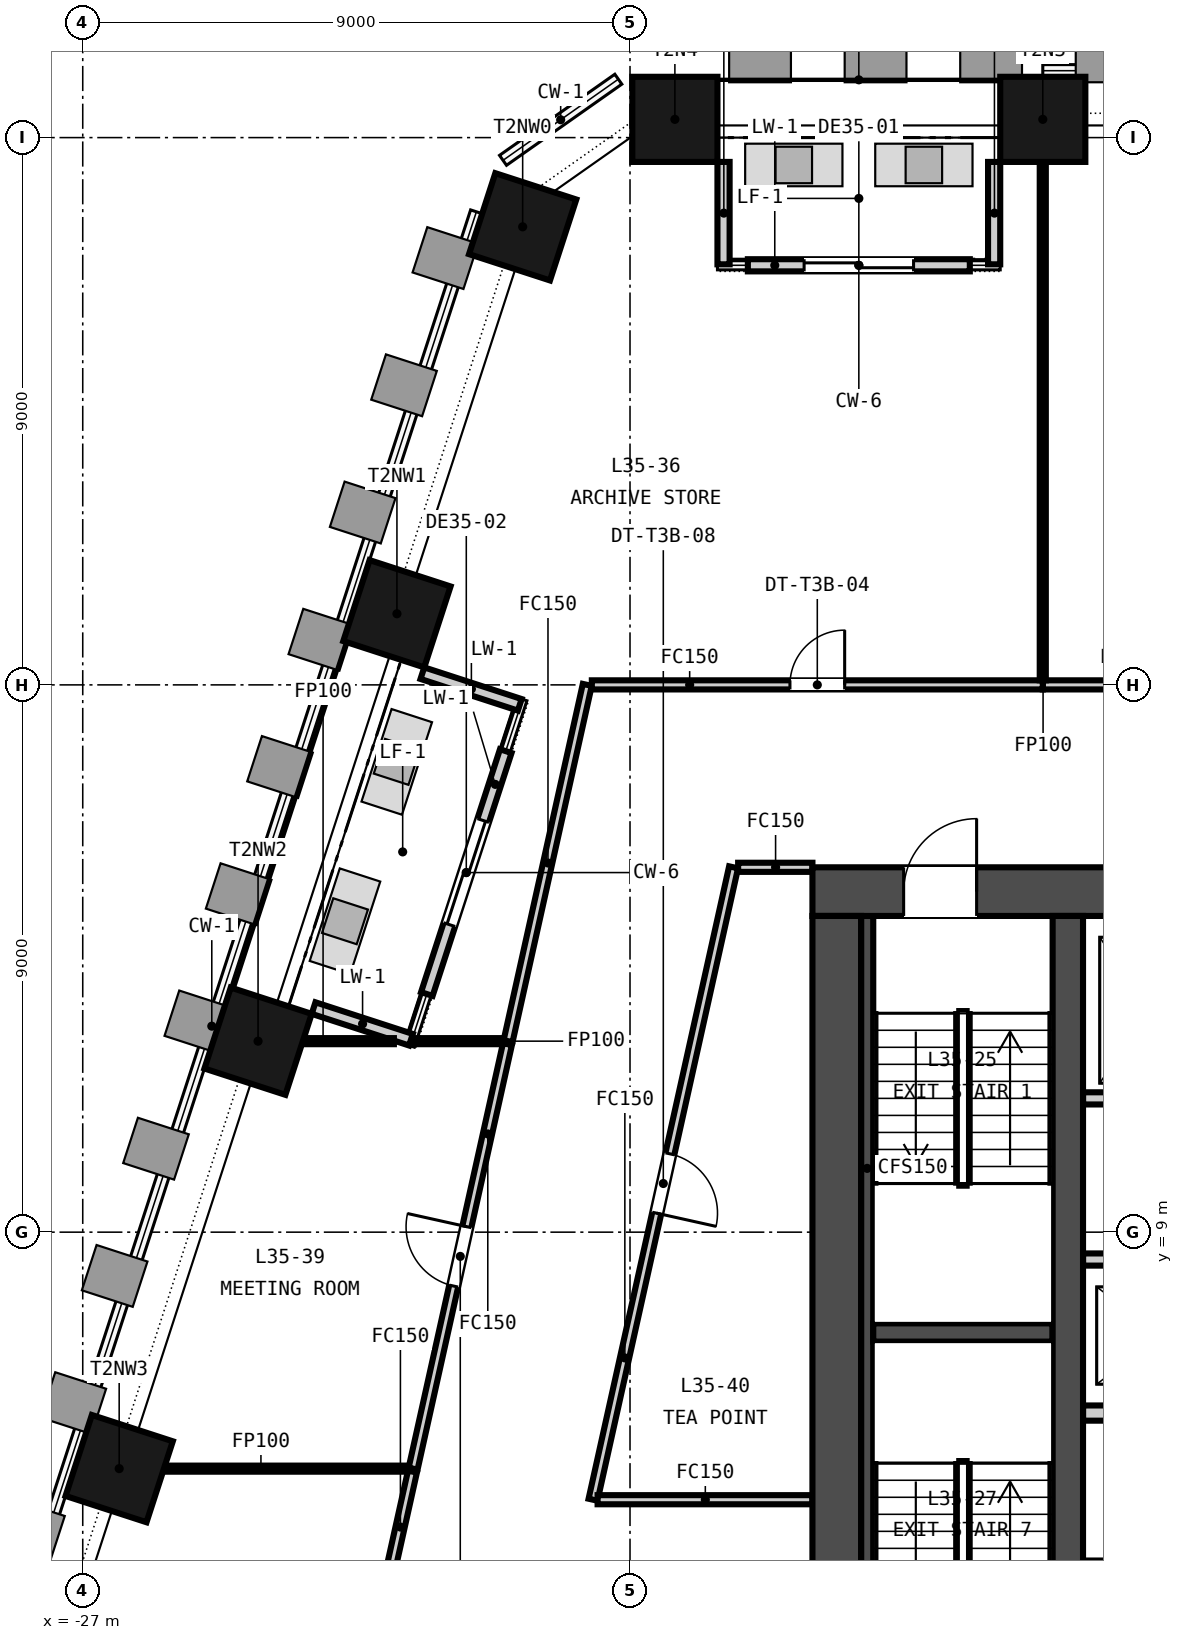
"""IFC4 building model, lengths in metres.
Left out: names, types, materials, properties, quantities, classifications, styles, units other than length and angle.
Written with IfcOpenShell. Run it as: python <this file> out.ifc"""

import sys

from ifc_helpers import new_model, si_unit, direction, frame, frame_2d, origin, origin_2d, place, context, subcontext, project, spatial, rectangle, extrude, element, fill, save


model = new_model("IFC4")
c1 = context("Model", 3, precision=1e-05, world=origin(), true_north=direction((0.0, 1.0)))
c2 = subcontext(c1, "Body", "Model", "MODEL_VIEW")
j1 = project(units=[si_unit("LENGTHUNIT", "METRE"), si_unit("PLANEANGLEUNIT", "RADIAN")], contexts=[c1])
p1 = place(None, origin())
s1 = spatial("IfcSite", under=j1, at=p1, CompositionType="ELEMENT")
p2 = place(p1, origin())
s2 = spatial("IfcBuilding", under=s1, at=p2, CompositionType="ELEMENT")
p3 = place(p2, frame((0.0, 0.0, 144.4)))
s3 = spatial("IfcBuildingStorey", under=s2, at=p3, CompositionType="ELEMENT", Elevation=144.4)
p4 = place(p3, frame((-15.0, 14.6, -0.15), z_axis=(0.0, 0.0, 1.0), x_axis=(1.0, 0.0, 0.0)))
e1 = element("IfcWall", 1, at=p4, inside=s3, PredefinedType="SOLIDWALL", context=c2, shape_type="SweptSolid", body=[
    extrude(rectangle(XDim=30.0, YDim=0.8, at=frame_2d((15.0, 0.0))), origin(), (0.0, 0.0, 1.0), 3.65),
])
p5 = place(p4, frame((9.25, 0.0, 0.15)))
e2 = element("IfcOpeningElement", 2, at=p5, cuts=e1, PredefinedType="OPENING", context=c2, shape_type="SweptSolid", body=[
    extrude(rectangle(XDim=1.5, YDim=2.1, at=frame_2d((0.75, 1.05))), frame((0.0, 0.41, 0.0), z_axis=(0.0, -1.0, 0.0), x_axis=(1.0, 0.0, 0.0)), (0.0, 0.0, 1.0), 0.82),
])
p6 = place(p4, frame((19.4, 0.0, 0.15)))
e3 = element("IfcOpeningElement", 3, at=p6, cuts=e1, PredefinedType="OPENING", context=c2, shape_type="SweptSolid", body=[
    extrude(rectangle(XDim=1.5, YDim=2.1, at=frame_2d((0.75, 1.05))), frame((0.0, 0.41, 0.0), z_axis=(0.0, -1.0, 0.0), x_axis=(1.0, 0.0, 0.0)), (0.0, 0.0, 1.0), 0.82),
])
p7 = place(p4, frame((1.5, 0.0, 0.15)))
e4 = element("IfcOpeningElement", 4, at=p7, cuts=e1, PredefinedType="OPENING", context=c2, shape_type="SweptSolid", body=[
    extrude(rectangle(XDim=1.2, YDim=2.1, at=frame_2d((0.6, 1.05))), frame((0.0, 0.41, 0.0), z_axis=(0.0, -1.0, 0.0), x_axis=(1.0, 0.0, 0.0)), (0.0, 0.0, 1.0), 0.82),
])
p8 = place(p4, frame((27.3, 0.0, 0.15)))
e5 = element("IfcOpeningElement", 5, at=p8, cuts=e1, PredefinedType="OPENING", context=c2, shape_type="SweptSolid", body=[
    extrude(rectangle(XDim=1.2, YDim=2.1, at=frame_2d((0.6, 1.05))), frame((0.0, 0.41, 0.0), z_axis=(0.0, -1.0, 0.0), x_axis=(1.0, 0.0, 0.0)), (0.0, 0.0, 1.0), 0.82),
])
p9 = place(p3, frame((-14.6, 0.8, -0.15), z_axis=(0.0, 0.0, 1.0), x_axis=(0.0, 1.0, 0.0)))
e6 = element("IfcWall", 6, at=p9, inside=s3, PredefinedType="SOLIDWALL", context=c2, shape_type="SweptSolid", body=[
    extrude(rectangle(XDim=13.4, YDim=0.8, at=frame_2d((6.7, 0.0))), origin(), (0.0, 0.0, 1.0), 3.65),
])
p10 = place(p3, frame((-10.8, 0.8, -0.15), z_axis=(0.0, 0.0, 1.0), x_axis=(0.0, 1.0, 0.0)))
e7 = element("IfcWall", 7, at=p10, inside=s3, PredefinedType="SOLIDWALL", context=c2, shape_type="SweptSolid", body=[
    extrude(rectangle(XDim=13.4, YDim=0.5, at=frame_2d((6.7, 0.0))), origin(), (0.0, 0.0, 1.0), 3.65),
])
for number, where, z_axis, x_axis in (
    (8, (-11.212, 27.3, -0.15), (0.0, 0.0, 1.0), (-1.0, 0.0, 0.0)),
    (9, (-17.262, 27.3, -0.15), (0.0, 0.0, 1.0), (-1.0, 0.0, 0.0)),
    (10, (-19.765, 25.533, -0.15), (0.0, 0.0, 1.0), (-0.309, -0.951, 0.0)),
    (11, (-21.833, 19.17, -0.15), (0.0, 0.0, 1.0), (-0.309, -0.951, 0.0)),
    (12, (-24.117, 12.141, -0.15), (0.0, 0.0, 1.0), (-0.309, -0.951, 0.0)),
    (13, (-26.401, 5.111, -0.15), (0.0, 0.0, 1.0), (-0.309, -0.951, 0.0)),
):
    element("IfcColumn", number, at=place(p3, frame(where, z_axis=z_axis, x_axis=x_axis)), inside=s3, PredefinedType="COLUMN", context=c2, shape_type="SweptSolid", body=[
        extrude(rectangle(XDim=1.4, YDim=1.4, at=origin_2d()), origin(), (0.0, 0.0, 1.0), 3.65),
    ])
p11 = place(p3, frame((-12.412, 24.9, 0.0), z_axis=(0.0, 0.0, 1.0), x_axis=(-1.0, 0.0, 0.0)))
e14 = element("IfcWall", 14, at=p11, inside=s3, PredefinedType="SOLIDWALL", context=c2, shape_type="SweptSolid", body=[
    extrude(rectangle(XDim=3.65, YDim=0.2, at=frame_2d((1.825, 0.0))), origin(), (0.0, 0.0, 1.0), 2.751),
])
p12 = place(p11, frame((0.925, 0.0, 0.0)))
e15 = element("IfcOpeningElement", 15, at=p12, cuts=e14, PredefinedType="OPENING", context=c2, shape_type="SweptSolid", body=[
    extrude(rectangle(XDim=1.8, YDim=2.4, at=frame_2d((0.9, 1.2))), frame((0.0, 0.11, 0.0), z_axis=(0.0, -1.0, 0.0), x_axis=(1.0, 0.0, 0.0)), (0.0, 0.0, 1.0), 0.22),
])
for number, where, z_axis, x_axis in (
    (16, (-12.012, 26.6, 0.0), (0.0, 0.0, 1.0), (0.0, -1.0, 0.0)),
    (17, (-16.462, 26.6, 0.0), (0.0, 0.0, 1.0), (0.0, -1.0, 0.0)),
):
    element("IfcWall", number, at=place(p3, frame(where, z_axis=z_axis, x_axis=x_axis)), inside=s3, PredefinedType="SOLIDWALL", context=c2, shape_type="SweptSolid", body=[
        extrude(rectangle(XDim=1.684, YDim=0.2, at=frame_2d((0.842, 0.0))), origin(), (0.0, 0.0, 1.0), 3.05),
    ])
p13 = place(p3, frame((-20.043, 16.911, 0.0), z_axis=(0.0, 0.0, 1.0), x_axis=(-0.30901640812, -0.951056706781, 0.0)))
e18 = element("IfcWall", 18, at=p13, inside=s3, PredefinedType="SOLIDWALL", context=c2, shape_type="SweptSolid", body=[
    extrude(rectangle(XDim=4.2, YDim=0.2, at=frame_2d((2.1, 0.0))), origin(), (0.0, 0.0, 1.0), 2.894),
])
p14 = place(p13, frame((1.2, 0.0, 0.0)))
e19 = element("IfcOpeningElement", 19, at=p14, cuts=e18, PredefinedType="OPENING", context=c2, shape_type="SweptSolid", body=[
    extrude(rectangle(XDim=1.8, YDim=2.4, at=frame_2d((0.9, 1.2))), frame((0.0, 0.11, 0.0), z_axis=(0.0, -1.0, 0.0), x_axis=(1.0, 0.0, 0.0)), (0.0, 0.0, 1.0), 0.22),
])
p15 = place(p3, frame((-21.415, 18.192, 0.0), z_axis=(0.0, 0.0, 1.0), x_axis=(0.951076677115, -0.308954938862, 0.0)))
e20 = element("IfcWall", 20, at=p15, inside=s3, PredefinedType="SOLIDWALL", context=c2, shape_type="SweptSolid", body=[
    extrude(rectangle(XDim=1.684, YDim=0.2, at=frame_2d((0.842, 0.0))), origin(), (0.0, 0.0, 1.0), 2.897),
])
p16 = place(p3, frame((-23.204, 12.685, 0.0), z_axis=(0.0, 0.0, 1.0), x_axis=(0.951034068731, -0.309086072338, 0.0)))
e21 = element("IfcWall", 21, at=p16, inside=s3, PredefinedType="SOLIDWALL", context=c2, shape_type="SweptSolid", body=[
    extrude(rectangle(XDim=1.684, YDim=0.2, at=frame_2d((0.842, 0.0))), origin(), (0.0, 0.0, 1.0), 2.9),
])
p17 = place(p3, frame((-10.55, 6.025, 0.0), z_axis=(0.0, 0.0, 1.0), x_axis=(1.0, 0.0, 0.0)))
e22 = element("IfcWall", 22, at=p17, inside=s3, PredefinedType="PARTITIONING", context=c2, shape_type="SweptSolid", body=[
    extrude(rectangle(XDim=21.1, YDim=0.25, at=frame_2d((10.55, 0.0))), origin(), (0.0, 0.0, 1.0), 3.5),
])
p18 = place(p3, frame((-10.55, 8.55, 0.0), z_axis=(0.0, 0.0, 1.0), x_axis=(1.0, 0.0, 0.0)))
e23 = element("IfcWall", 23, at=p18, inside=s3, PredefinedType="PARTITIONING", context=c2, shape_type="SweptSolid", body=[
    extrude(rectangle(XDim=21.1, YDim=0.2, at=frame_2d((10.55, 0.0))), origin(), (0.0, 0.0, 1.0), 3.5),
])
p19 = place(p18, frame((0.675, 0.0, 0.0)))
e24 = element("IfcOpeningElement", 24, at=p19, cuts=e23, PredefinedType="OPENING", context=c2, shape_type="SweptSolid", body=[
    extrude(rectangle(XDim=1.2, YDim=2.1, at=frame_2d((0.6, 1.05))), frame((0.0, 0.11, 0.0), z_axis=(0.0, -1.0, 0.0), x_axis=(1.0, 0.0, 0.0)), (0.0, 0.0, 1.0), 0.22),
])
p20 = place(p18, frame((3.475, 0.0, 0.0)))
e25 = element("IfcOpeningElement", 25, at=p20, cuts=e23, PredefinedType="OPENING", context=c2, shape_type="SweptSolid", body=[
    extrude(rectangle(XDim=1.2, YDim=2.1, at=frame_2d((0.6, 1.05))), frame((0.0, 0.11, 0.0), z_axis=(0.0, -1.0, 0.0), x_axis=(1.0, 0.0, 0.0)), (0.0, 0.0, 1.0), 0.22),
])
p21 = place(p18, frame((6.275, 0.0, 0.0)))
e26 = element("IfcOpeningElement", 26, at=p21, cuts=e23, PredefinedType="OPENING", context=c2, shape_type="SweptSolid", body=[
    extrude(rectangle(XDim=1.2, YDim=2.1, at=frame_2d((0.6, 1.05))), frame((0.0, 0.11, 0.0), z_axis=(0.0, -1.0, 0.0), x_axis=(1.0, 0.0, 0.0)), (0.0, 0.0, 1.0), 0.22),
])
p22 = place(p18, frame((9.075, 0.0, 0.0)))
e27 = element("IfcOpeningElement", 27, at=p22, cuts=e23, PredefinedType="OPENING", context=c2, shape_type="SweptSolid", body=[
    extrude(rectangle(XDim=1.2, YDim=2.1, at=frame_2d((0.6, 1.05))), frame((0.0, 0.11, 0.0), z_axis=(0.0, -1.0, 0.0), x_axis=(1.0, 0.0, 0.0)), (0.0, 0.0, 1.0), 0.22),
])
p23 = place(p18, frame((11.875, 0.0, 0.0)))
e28 = element("IfcOpeningElement", 28, at=p23, cuts=e23, PredefinedType="OPENING", context=c2, shape_type="SweptSolid", body=[
    extrude(rectangle(XDim=1.2, YDim=2.1, at=frame_2d((0.6, 1.05))), frame((0.0, 0.11, 0.0), z_axis=(0.0, -1.0, 0.0), x_axis=(1.0, 0.0, 0.0)), (0.0, 0.0, 1.0), 0.22),
])
p24 = place(p18, frame((14.675, 0.0, 0.0)))
e29 = element("IfcOpeningElement", 29, at=p24, cuts=e23, PredefinedType="OPENING", context=c2, shape_type="SweptSolid", body=[
    extrude(rectangle(XDim=1.2, YDim=2.1, at=frame_2d((0.6, 1.05))), frame((0.0, 0.11, 0.0), z_axis=(0.0, -1.0, 0.0), x_axis=(1.0, 0.0, 0.0)), (0.0, 0.0, 1.0), 0.22),
])
p25 = place(p18, frame((17.475, 0.0, 0.0)))
e30 = element("IfcOpeningElement", 30, at=p25, cuts=e23, PredefinedType="OPENING", context=c2, shape_type="SweptSolid", body=[
    extrude(rectangle(XDim=1.2, YDim=2.1, at=frame_2d((0.6, 1.05))), frame((0.0, 0.11, 0.0), z_axis=(0.0, -1.0, 0.0), x_axis=(1.0, 0.0, 0.0)), (0.0, 0.0, 1.0), 0.22),
])
p26 = place(p18, frame((19.9, 0.0, 0.0)))
e31 = element("IfcOpeningElement", 31, at=p26, cuts=e23, PredefinedType="OPENING", context=c2, shape_type="SweptSolid", body=[
    extrude(rectangle(XDim=0.9, YDim=2.1, at=frame_2d((0.45, 1.05))), frame((0.0, 0.11, 0.0), z_axis=(0.0, -1.0, 0.0), x_axis=(1.0, 0.0, 0.0)), (0.0, 0.0, 1.0), 0.22),
])
p27 = place(p3, frame((-10.55, 11.2, 0.0), z_axis=(0.0, 0.0, 1.0), x_axis=(1.0, 0.0, 0.0)))
e32 = element("IfcWall", 32, at=p27, inside=s3, PredefinedType="PARTITIONING", context=c2, shape_type="SweptSolid", body=[
    extrude(rectangle(XDim=4.8, YDim=0.2, at=frame_2d((2.4, 0.0))), origin(), (0.0, 0.0, 1.0), 3.5),
])
p28 = place(p27, frame((0.525, 0.0, 0.0)))
e33 = element("IfcOpeningElement", 33, at=p28, cuts=e32, PredefinedType="OPENING", context=c2, shape_type="SweptSolid", body=[
    extrude(rectangle(XDim=1.1, YDim=2.1, at=frame_2d((0.55, 1.05))), frame((0.0, 0.11, 0.0), z_axis=(0.0, -1.0, 0.0), x_axis=(1.0, 0.0, 0.0)), (0.0, 0.0, 1.0), 0.22),
])
p29 = place(p27, frame((2.925, 0.0, 0.0)))
e34 = element("IfcOpeningElement", 34, at=p29, cuts=e32, PredefinedType="OPENING", context=c2, shape_type="SweptSolid", body=[
    extrude(rectangle(XDim=1.1, YDim=2.1, at=frame_2d((0.55, 1.05))), frame((0.0, 0.11, 0.0), z_axis=(0.0, -1.0, 0.0), x_axis=(1.0, 0.0, 0.0)), (0.0, 0.0, 1.0), 0.22),
])
p30 = place(p3, frame((-14.0, 7.35, 0.0), z_axis=(0.0, 0.0, 1.0), x_axis=(1.0, 0.0, 0.0)))
e35 = element("IfcWall", 35, at=p30, inside=s3, PredefinedType="SOLIDWALL", context=c2, shape_type="SweptSolid", body=[
    extrude(rectangle(XDim=2.95, YDim=0.3, at=frame_2d((1.475, 0.0))), origin(), (0.0, 0.0, 1.0), 3.5),
])
p31 = place(p3, frame((-14.1, 0.8, 0.0), z_axis=(0.0, 0.0, 1.0), x_axis=(0.0, 1.0, 0.0)))
e36 = element("IfcWall", 36, at=p31, inside=s3, PredefinedType="SOLIDWALL", context=c2, shape_type="SweptSolid", body=[
    extrude(rectangle(XDim=13.4, YDim=0.2, at=frame_2d((6.7, 0.0))), origin(), (0.0, 0.0, 1.0), 3.5),
])
p32 = place(p3, frame((-16.297, 15.0, 0.0), z_axis=(0.0, 0.0, 1.0), x_axis=(-0.216903766867, -0.976192991124, 0.0)))
e37 = element("IfcWall", 37, at=p32, inside=s3, PredefinedType="PARTITIONING", context=c2, shape_type="SweptSolid", body=[
    extrude(rectangle(XDim=10.654, YDim=0.15, at=frame_2d((5.327, 0.0))), origin(), (0.0, 0.0, 1.0), 2.741),
])
p33 = place(p32, frame((4.827, 0.0, 0.0)))
e38 = element("IfcOpeningElement", 38, at=p33, cuts=e37, PredefinedType="OPENING", context=c2, shape_type="SweptSolid", body=[
    extrude(rectangle(XDim=1.0, YDim=2.1, at=frame_2d((0.5, 1.05))), frame((0.0, 0.085, 0.0), z_axis=(0.0, -1.0, 0.0), x_axis=(1.0, 0.0, 0.0)), (0.0, 0.0, 1.0), 0.17),
])
p34 = place(p3, frame((-15.0, 15.0, 0.0), z_axis=(0.0, 0.0, 1.0), x_axis=(-1.0, 0.0, 0.0)))
e39 = element("IfcWall", 39, at=p34, inside=s3, PredefinedType="PARTITIONING", context=c2, shape_type="SweptSolid", body=[
    extrude(rectangle(XDim=1.222, YDim=0.15, at=frame_2d((0.611, 0.0))), origin(), (0.0, 0.0, 1.0), 2.741),
])
p35 = place(p3, frame((-11.212, 18.0, 0.0), z_axis=(0.0, 0.0, 1.0), x_axis=(1.0, 0.0, 0.0)))
e40 = element("IfcWall", 40, at=p35, inside=s3, PredefinedType="PARTITIONING", context=c2, shape_type="SweptSolid", body=[
    extrude(rectangle(XDim=6.75, YDim=0.15, at=frame_2d((3.375, 0.0))), origin(), (0.0, 0.0, 1.0), 2.741),
])
p36 = place(p35, frame((2.875, 0.0, 0.0)))
e41 = element("IfcOpeningElement", 41, at=p36, cuts=e40, PredefinedType="OPENING", context=c2, shape_type="SweptSolid", body=[
    extrude(rectangle(XDim=1.0, YDim=2.1, at=frame_2d((0.5, 1.05))), frame((0.0, 0.085, 0.0), z_axis=(0.0, -1.0, 0.0), x_axis=(1.0, 0.0, 0.0)), (0.0, 0.0, 1.0), 0.17),
])
p37 = place(p3, frame((-20.005, 12.141, 0.0), z_axis=(0.0, 0.0, 1.0), x_axis=(0.216934764879, 0.976186103049, 0.0)))
e42 = element("IfcWall", 42, at=p37, inside=s3, PredefinedType="PARTITIONING", context=c2, shape_type="SweptSolid", body=[
    extrude(rectangle(XDim=6.002, YDim=0.15, at=frame_2d((3.001, 0.0))), origin(), (0.0, 0.0, 1.0), 2.741),
])
p38 = place(p3, frame((-18.628, 18.0, 0.0), z_axis=(0.0, 0.0, 1.0), x_axis=(1.0, 0.0, 0.0)))
e43 = element("IfcWall", 43, at=p38, inside=s3, PredefinedType="PARTITIONING", context=c2, shape_type="SweptSolid", body=[
    extrude(rectangle(XDim=7.416, YDim=0.15, at=frame_2d((3.708, 0.0))), origin(), (0.0, 0.0, 1.0), 2.741),
])
p39 = place(p38, frame((3.258, 0.0, 0.0)))
e44 = element("IfcOpeningElement", 44, at=p39, cuts=e43, PredefinedType="OPENING", context=c2, shape_type="SweptSolid", body=[
    extrude(rectangle(XDim=0.9, YDim=2.1, at=frame_2d((0.45, 1.05))), frame((0.0, 0.085, 0.0), z_axis=(0.0, -1.0, 0.0), x_axis=(1.0, 0.0, 0.0)), (0.0, 0.0, 1.0), 0.17),
])
p40 = place(p3, frame((-11.212, 18.075, 0.0), z_axis=(0.0, 0.0, 1.0), x_axis=(0.0, 1.0, 0.0)))
e45 = element("IfcWall", 45, at=p40, inside=s3, PredefinedType="PARTITIONING", context=c2, shape_type="SweptSolid", body=[
    extrude(rectangle(XDim=9.325, YDim=0.1, at=frame_2d((4.663, 0.0))), origin(), (0.0, 0.0, 1.0), 2.741),
])
p41 = place(p3, frame((-24.222, 12.141, 0.0), z_axis=(0.0, 0.0, 1.0), x_axis=(1.0, 0.0, 0.0)))
e46 = element("IfcWall", 46, at=p41, inside=s3, PredefinedType="PARTITIONING", context=c2, shape_type="SweptSolid", body=[
    extrude(rectangle(XDim=2.339, YDim=0.1, at=frame_2d((1.169, 0.0))), origin(), (0.0, 0.0, 1.0), 2.741),
])
p42 = place(p3, frame((-21.546, 12.141, 0.0), z_axis=(0.0, 0.0, 1.0), x_axis=(1.0, 0.0, 0.0)))
e47 = element("IfcWall", 47, at=p42, inside=s3, PredefinedType="PARTITIONING", context=c2, shape_type="SweptSolid", body=[
    extrude(rectangle(XDim=1.466, YDim=0.1, at=frame_2d((0.733, 0.0))), origin(), (0.0, 0.0, 1.0), 2.741),
])
p43 = place(p3, frame((-21.567, 5.111, 0.0), z_axis=(0.0, 0.0, 1.0), x_axis=(0.216883466585, 0.976197501494, 0.0)))
e48 = element("IfcWall", 48, at=p43, inside=s3, PredefinedType="PARTITIONING", context=c2, shape_type="SweptSolid", body=[
    extrude(rectangle(XDim=7.151, YDim=0.15, at=frame_2d((3.576, 0.0))), origin(), (0.0, 0.0, 1.0), 2.741),
])
p44 = place(p43, frame((3.076, 0.0, 0.0)))
e49 = element("IfcOpeningElement", 49, at=p44, cuts=e48, PredefinedType="OPENING", context=c2, shape_type="SweptSolid", body=[
    extrude(rectangle(XDim=1.0, YDim=2.1, at=frame_2d((0.5, 1.05))), frame((0.0, 0.085, 0.0), z_axis=(0.0, -1.0, 0.0), x_axis=(1.0, 0.0, 0.0)), (0.0, 0.0, 1.0), 0.17),
])
p45 = place(p3, frame((-26.506, 5.111, 0.0), z_axis=(0.0, 0.0, 1.0), x_axis=(1.0, 0.0, 0.0)))
e50 = element("IfcWall", 50, at=p45, inside=s3, PredefinedType="PARTITIONING", context=c2, shape_type="SweptSolid", body=[
    extrude(rectangle(XDim=4.863, YDim=0.1, at=frame_2d((2.432, 0.0))), origin(), (0.0, 0.0, 1.0), 2.741),
])
p46 = place(p3, frame((-18.533, 4.6, 0.0), z_axis=(0.0, 0.0, 1.0), x_axis=(1.0, 0.0, 0.0)))
e51 = element("IfcWall", 51, at=p46, inside=s3, PredefinedType="PARTITIONING", context=c2, shape_type="SweptSolid", body=[
    extrude(rectangle(XDim=3.533, YDim=0.15, at=frame_2d((1.767, 0.0))), origin(), (0.0, 0.0, 1.0), 2.741),
])
p47 = place(p3, frame((-21.984, 3.238, 0.0), z_axis=(0.0, 0.0, 1.0), x_axis=(0.217151800435, 0.976137846601, 0.0)))
e52 = element("IfcWall", 52, at=p47, inside=s3, PredefinedType="PARTITIONING", context=c2, shape_type="SweptSolid", body=[
    extrude(rectangle(XDim=1.869, YDim=0.15, at=frame_2d((0.934, 0.0))), origin(), (0.0, 0.0, 1.0), 2.741),
])
p48 = place(p12, origin())
e53 = element("IfcDoor", 53, at=p48, inside=s3, OperationType="SINGLE_SWING_LEFT", PredefinedType="DOOR", context=c2, shape_type="SweptSolid", body=[
    extrude(rectangle(XDim=1.8, YDim=2.4, at=frame_2d((0.9, 1.2))), frame((0.0, 0.025, 0.0), z_axis=(0.0, -1.0, 0.0), x_axis=(1.0, 0.0, 0.0)), (0.0, 0.0, 1.0), 0.05),
])
fill(e15, e53)
p49 = place(p14, origin())
e54 = element("IfcDoor", 54, at=p49, inside=s3, OperationType="SINGLE_SWING_LEFT", PredefinedType="DOOR", context=c2, shape_type="SweptSolid", body=[
    extrude(rectangle(XDim=1.8, YDim=2.4, at=frame_2d((0.9, 1.2))), frame((0.0, 0.025, 0.0), z_axis=(0.0, -1.0, 0.0), x_axis=(1.0, 0.0, 0.0)), (0.0, 0.0, 1.0), 0.05),
])
fill(e19, e54)
p50 = place(p7, origin())
e55 = element("IfcDoor", 55, at=p50, inside=s3, OperationType="SINGLE_SWING_RIGHT", PredefinedType="DOOR", context=c2, shape_type="SweptSolid", body=[
    extrude(rectangle(XDim=1.2, YDim=2.1, at=frame_2d((0.6, 1.05))), frame((0.0, 0.025, 0.0), z_axis=(0.0, -1.0, 0.0), x_axis=(1.0, 0.0, 0.0)), (0.0, 0.0, 1.0), 0.05),
])
fill(e4, e55)
p51 = place(p39, origin())
e56 = element("IfcDoor", 56, at=p51, inside=s3, OperationType="SINGLE_SWING_RIGHT", PredefinedType="DOOR", context=c2, shape_type="SweptSolid", body=[
    extrude(rectangle(XDim=0.9, YDim=2.1, at=frame_2d((0.45, 1.05))), frame((0.0, 0.025, 0.0), z_axis=(0.0, -1.0, 0.0), x_axis=(1.0, 0.0, 0.0)), (0.0, 0.0, 1.0), 0.05),
])
fill(e44, e56)
p52 = place(p44, origin())
e57 = element("IfcDoor", 57, at=p52, inside=s3, OperationType="SINGLE_SWING_RIGHT", PredefinedType="DOOR", context=c2, shape_type="SweptSolid", body=[
    extrude(rectangle(XDim=1.0, YDim=2.1, at=frame_2d((0.5, 1.05))), frame((0.0, 0.025, 0.0), z_axis=(0.0, -1.0, 0.0), x_axis=(1.0, 0.0, 0.0)), (0.0, 0.0, 1.0), 0.05),
])
fill(e49, e57)
p53 = place(p33, origin())
e58 = element("IfcDoor", 58, at=p53, inside=s3, OperationType="SINGLE_SWING_RIGHT", PredefinedType="DOOR", context=c2, shape_type="SweptSolid", body=[
    extrude(rectangle(XDim=1.0, YDim=2.1, at=frame_2d((0.5, 1.05))), frame((0.0, 0.025, 0.0), z_axis=(0.0, -1.0, 0.0), x_axis=(1.0, 0.0, 0.0)), (0.0, 0.0, 1.0), 0.05),
])
fill(e38, e58)
save(model, sys.argv[1])
